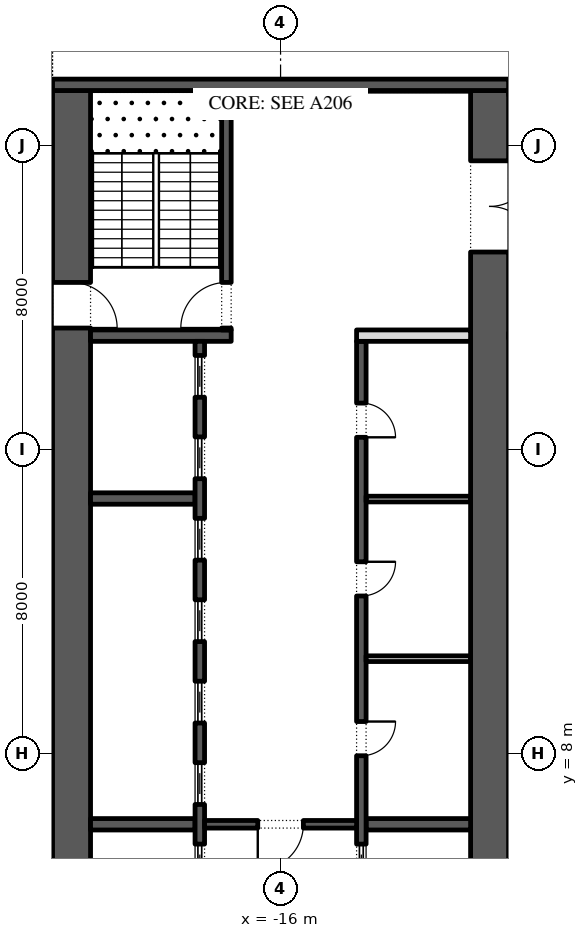
"""IFC4 building model, lengths in metres.
Left out: names, types, materials, properties, quantities, classifications, styles, units other than length and angle.
Written with IfcOpenShell. Run it as: python <this file> out.ifc"""

import sys

from ifc_helpers import new_model, si_unit, direction, frame, frame_2d, origin, place, context, subcontext, project, spatial, rectangle, extrude, element, fill, save


model = new_model("IFC4")
c1 = context("Model", 3, precision=1e-05, world=origin(), true_north=direction((0.0, 1.0)))
c2 = subcontext(c1, "Body", "Model", "MODEL_VIEW")
j1 = project(units=[si_unit("LENGTHUNIT", "METRE"), si_unit("PLANEANGLEUNIT", "RADIAN")], contexts=[c1])
p1 = place(None, origin())
s1 = spatial("IfcSite", under=j1, at=p1, CompositionType="ELEMENT")
p2 = place(p1, origin())
s2 = spatial("IfcBuilding", under=s1, at=p2, CompositionType="ELEMENT")
p3 = place(p2, frame((0.0, 0.0, 19.2)))
s3 = spatial("IfcBuildingStorey", under=s2, at=p3, CompositionType="ELEMENT", Elevation=19.2)
p4 = place(p3, frame((-21.5, -2.45, 0.0), z_axis=(0.0, 0.0, 1.0), x_axis=(0.0, 1.0, 0.0)))
e1 = element("IfcWall", 1, at=p4, inside=s3, PredefinedType="SHEAR", context=c2, shape_type="SweptSolid", body=[
    extrude(rectangle(XDim=27.9, YDim=1.0, at=frame_2d((13.95, 0.0))), origin(), (0.0, 0.0, 1.0), 4.5),
])
p5 = place(p4, frame((5.05, 0.0, 0.0)))
e2 = element("IfcOpeningElement", 2, at=p5, cuts=e1, PredefinedType="OPENING", context=c2, shape_type="SweptSolid", body=[
    extrude(rectangle(XDim=1.2, YDim=2.1, at=frame_2d((0.6, 1.05))), frame((0.0, 0.51, 0.0), z_axis=(0.0, -1.0, 0.0), x_axis=(1.0, 0.0, 0.0)), (0.0, 0.0, 1.0), 1.02),
])
p6 = place(p4, frame((21.65, 0.0, 0.0)))
e3 = element("IfcOpeningElement", 3, at=p6, cuts=e1, PredefinedType="OPENING", context=c2, shape_type="SweptSolid", body=[
    extrude(rectangle(XDim=1.2, YDim=2.1, at=frame_2d((0.6, 1.05))), frame((0.0, 0.51, 0.0), z_axis=(0.0, -1.0, 0.0), x_axis=(1.0, 0.0, 0.0)), (0.0, 0.0, 1.0), 1.02),
])
p7 = place(p3, frame((-10.5, -2.45, 0.0), z_axis=(0.0, 0.0, 1.0), x_axis=(0.0, 1.0, 0.0)))
e4 = element("IfcWall", 4, at=p7, inside=s3, PredefinedType="SHEAR", context=c2, shape_type="SweptSolid", body=[
    extrude(rectangle(XDim=27.9, YDim=1.0, at=frame_2d((13.95, 0.0))), origin(), (0.0, 0.0, 1.0), 4.5),
])
p8 = place(p7, frame((23.65, 0.0, 0.0)))
e5 = element("IfcOpeningElement", 5, at=p8, cuts=e4, PredefinedType="OPENING", context=c2, shape_type="SweptSolid", body=[
    extrude(rectangle(XDim=2.4, YDim=2.1, at=frame_2d((1.2, 1.05))), frame((0.0, 0.51, 0.0), z_axis=(0.0, -1.0, 0.0), x_axis=(1.0, 0.0, 0.0)), (0.0, 0.0, 1.0), 1.02),
])
p9 = place(p7, frame((0.788, 0.0, 0.0)))
e6 = element("IfcOpeningElement", 6, at=p9, cuts=e4, PredefinedType="OPENING", context=c2, shape_type="SweptSolid", body=[
    extrude(rectangle(XDim=0.9, YDim=2.1, at=frame_2d((0.45, 1.05))), frame((0.0, 0.51, 0.0), z_axis=(0.0, -1.0, 0.0), x_axis=(1.0, 0.0, 0.0)), (0.0, 0.0, 1.0), 1.02),
])
p10 = place(p7, frame((4.012, 0.0, 0.0)))
e7 = element("IfcOpeningElement", 7, at=p10, cuts=e4, PredefinedType="OPENING", context=c2, shape_type="SweptSolid", body=[
    extrude(rectangle(XDim=0.9, YDim=2.1, at=frame_2d((0.45, 1.05))), frame((0.0, 0.51, 0.0), z_axis=(0.0, -1.0, 0.0), x_axis=(1.0, 0.0, 0.0)), (0.0, 0.0, 1.0), 1.02),
])
p11 = place(p3, frame((-22.0, 25.6, 0.0), z_axis=(0.0, 0.0, 1.0), x_axis=(1.0, 0.0, 0.0)))
e8 = element("IfcWall", 8, at=p11, inside=s3, PredefinedType="SHEAR", context=c2, shape_type="SweptSolid", body=[
    extrude(rectangle(XDim=12.0, YDim=0.3, at=frame_2d((6.0, 0.0))), origin(), (0.0, 0.0, 1.0), 4.5),
])
p12 = place(p3, frame((-21.0, 19.0, 0.0), z_axis=(0.0, 0.0, 1.0), x_axis=(1.0, 0.0, 0.0)))
e9 = element("IfcWall", 9, at=p12, inside=s3, PredefinedType="SHEAR", context=c2, shape_type="SweptSolid", body=[
    extrude(rectangle(XDim=3.7, YDim=0.3, at=frame_2d((1.85, 0.0))), origin(), (0.0, 0.0, 1.0), 4.5),
])
p13 = place(p3, frame((-17.425, 19.15, 0.0), z_axis=(0.0, 0.0, 1.0), x_axis=(0.0, 1.0, 0.0)))
e10 = element("IfcWall", 10, at=p13, inside=s3, PredefinedType="SHEAR", context=c2, shape_type="SweptSolid", body=[
    extrude(rectangle(XDim=6.3, YDim=0.25, at=frame_2d((3.15, 0.0))), origin(), (0.0, 0.0, 1.0), 4.5),
])
p14 = place(p13, frame((0.05, 0.0, 0.0)))
e11 = element("IfcOpeningElement", 11, at=p14, cuts=e10, PredefinedType="OPENING", context=c2, shape_type="SweptSolid", body=[
    extrude(rectangle(XDim=1.2, YDim=2.1, at=frame_2d((0.6, 1.05))), frame((0.0, 0.135, 0.0), z_axis=(0.0, -1.0, 0.0), x_axis=(1.0, 0.0, 0.0)), (0.0, 0.0, 1.0), 0.27),
])
for number, where, z_axis, x_axis in (
    (12, (-21.0, 6.143, 0.0), (0.0, 0.0, 1.0), (1.0, 0.0, 0.0)),
    (13, (-21.0, 14.714, 0.0), (0.0, 0.0, 1.0), (1.0, 0.0, 0.0)),
):
    element("IfcWall", number, at=place(p3, frame(where, z_axis=z_axis, x_axis=x_axis)), inside=s3, PredefinedType="SHEAR", context=c2, shape_type="SweptSolid", body=[
        extrude(rectangle(XDim=2.75, YDim=0.3, at=frame_2d((1.375, 0.0))), origin(), (0.0, 0.0, 1.0), 4.5),
    ])
p15 = place(p3, frame((-18.125, 4.15, 0.0), z_axis=(0.0, 0.0, 1.0), x_axis=(0.0, 1.0, 0.0)))
e14 = element("IfcWall", 14, at=p15, inside=s3, PredefinedType="SHEAR", context=c2, shape_type="SweptSolid", body=[
    extrude(rectangle(XDim=14.7, YDim=0.25, at=frame_2d((7.35, 0.0))), origin(), (0.0, 0.0, 1.0), 4.5),
])
p16 = place(p15, frame((0.371, 0.0, 0.0)))
e15 = element("IfcOpeningElement", 15, at=p16, cuts=e14, PredefinedType="OPENING", context=c2, shape_type="SweptSolid", body=[
    extrude(rectangle(XDim=1.1, YDim=2.1, at=frame_2d((0.55, 1.05))), frame((0.0, 0.135, 0.0), z_axis=(0.0, -1.0, 0.0), x_axis=(1.0, 0.0, 0.0)), (0.0, 0.0, 1.0), 0.27),
])
p17 = place(p15, frame((2.514, 0.0, 0.0)))
e16 = element("IfcOpeningElement", 16, at=p17, cuts=e14, PredefinedType="OPENING", context=c2, shape_type="SweptSolid", body=[
    extrude(rectangle(XDim=1.1, YDim=2.1, at=frame_2d((0.55, 1.05))), frame((0.0, 0.135, 0.0), z_axis=(0.0, -1.0, 0.0), x_axis=(1.0, 0.0, 0.0)), (0.0, 0.0, 1.0), 0.27),
])
p18 = place(p15, frame((4.657, 0.0, 0.0)))
e17 = element("IfcOpeningElement", 17, at=p18, cuts=e14, PredefinedType="OPENING", context=c2, shape_type="SweptSolid", body=[
    extrude(rectangle(XDim=1.1, YDim=2.1, at=frame_2d((0.55, 1.05))), frame((0.0, 0.135, 0.0), z_axis=(0.0, -1.0, 0.0), x_axis=(1.0, 0.0, 0.0)), (0.0, 0.0, 1.0), 0.27),
])
p19 = place(p15, frame((6.8, 0.0, 0.0)))
e18 = element("IfcOpeningElement", 18, at=p19, cuts=e14, PredefinedType="OPENING", context=c2, shape_type="SweptSolid", body=[
    extrude(rectangle(XDim=1.1, YDim=2.1, at=frame_2d((0.55, 1.05))), frame((0.0, 0.135, 0.0), z_axis=(0.0, -1.0, 0.0), x_axis=(1.0, 0.0, 0.0)), (0.0, 0.0, 1.0), 0.27),
])
p20 = place(p15, frame((8.943, 0.0, 0.0)))
e19 = element("IfcOpeningElement", 19, at=p20, cuts=e14, PredefinedType="OPENING", context=c2, shape_type="SweptSolid", body=[
    extrude(rectangle(XDim=1.1, YDim=2.1, at=frame_2d((0.55, 1.05))), frame((0.0, 0.135, 0.0), z_axis=(0.0, -1.0, 0.0), x_axis=(1.0, 0.0, 0.0)), (0.0, 0.0, 1.0), 0.27),
])
p21 = place(p15, frame((11.086, 0.0, 0.0)))
e20 = element("IfcOpeningElement", 20, at=p21, cuts=e14, PredefinedType="OPENING", context=c2, shape_type="SweptSolid", body=[
    extrude(rectangle(XDim=1.1, YDim=2.1, at=frame_2d((0.55, 1.05))), frame((0.0, 0.135, 0.0), z_axis=(0.0, -1.0, 0.0), x_axis=(1.0, 0.0, 0.0)), (0.0, 0.0, 1.0), 0.27),
])
p22 = place(p15, frame((13.229, 0.0, 0.0)))
e21 = element("IfcOpeningElement", 21, at=p22, cuts=e14, PredefinedType="OPENING", context=c2, shape_type="SweptSolid", body=[
    extrude(rectangle(XDim=1.1, YDim=2.1, at=frame_2d((0.55, 1.05))), frame((0.0, 0.135, 0.0), z_axis=(0.0, -1.0, 0.0), x_axis=(1.0, 0.0, 0.0)), (0.0, 0.0, 1.0), 0.27),
])
p23 = place(p3, frame((-13.75, 6.143, 0.0), z_axis=(0.0, 0.0, 1.0), x_axis=(1.0, 0.0, 0.0)))
e22 = element("IfcWall", 22, at=p23, inside=s3, PredefinedType="SHEAR", context=c2, shape_type="SweptSolid", body=[
    extrude(rectangle(XDim=2.75, YDim=0.3, at=frame_2d((1.375, 0.0))), origin(), (0.0, 0.0, 1.0), 4.5),
])
p24 = place(p3, frame((-13.875, -2.45, 0.0), z_axis=(0.0, 0.0, 1.0), x_axis=(0.0, 1.0, 0.0)))
e23 = element("IfcWall", 23, at=p24, inside=s3, PredefinedType="SHEAR", context=c2, shape_type="SweptSolid", body=[
    extrude(rectangle(XDim=21.3, YDim=0.25, at=frame_2d((10.65, 0.0))), origin(), (0.0, 0.0, 1.0), 4.5),
])
p25 = place(p24, frame((10.396, 0.0, 0.0)))
e24 = element("IfcOpeningElement", 24, at=p25, cuts=e23, PredefinedType="OPENING", context=c2, shape_type="SweptSolid", body=[
    extrude(rectangle(XDim=0.9, YDim=2.1, at=frame_2d((0.45, 1.05))), frame((0.0, 0.135, 0.0), z_axis=(0.0, -1.0, 0.0), x_axis=(1.0, 0.0, 0.0)), (0.0, 0.0, 1.0), 0.27),
])
p26 = place(p24, frame((14.6, 0.0, 0.0)))
e25 = element("IfcOpeningElement", 25, at=p26, cuts=e23, PredefinedType="OPENING", context=c2, shape_type="SweptSolid", body=[
    extrude(rectangle(XDim=0.9, YDim=2.1, at=frame_2d((0.45, 1.05))), frame((0.0, 0.135, 0.0), z_axis=(0.0, -1.0, 0.0), x_axis=(1.0, 0.0, 0.0)), (0.0, 0.0, 1.0), 0.27),
])
p27 = place(p24, frame((18.775, 0.0, 0.0)))
e26 = element("IfcOpeningElement", 26, at=p27, cuts=e23, PredefinedType="OPENING", context=c2, shape_type="SweptSolid", body=[
    extrude(rectangle(XDim=0.9, YDim=2.1, at=frame_2d((0.45, 1.05))), frame((0.0, 0.135, 0.0), z_axis=(0.0, -1.0, 0.0), x_axis=(1.0, 0.0, 0.0)), (0.0, 0.0, 1.0), 0.27),
])
p28 = place(p24, frame((6.971, 0.0, 0.0)))
e27 = element("IfcOpeningElement", 27, at=p28, cuts=e23, PredefinedType="OPENING", context=c2, shape_type="SweptSolid", body=[
    extrude(rectangle(XDim=1.1, YDim=2.1, at=frame_2d((0.55, 1.05))), frame((0.0, 0.135, 0.0), z_axis=(0.0, -1.0, 0.0), x_axis=(1.0, 0.0, 0.0)), (0.0, 0.0, 1.0), 0.27),
])
p29 = place(p3, frame((-14.0, 19.0, 0.0), z_axis=(0.0, 0.0, 1.0), x_axis=(1.0, 0.0, 0.0)))
e28 = element("IfcWall", 28, at=p29, inside=s3, PredefinedType="PARTITIONING", context=c2, shape_type="SweptSolid", body=[
    extrude(rectangle(XDim=3.0, YDim=0.3, at=frame_2d((1.5, 0.0))), origin(), (0.0, 0.0, 1.0), 4.5),
])
for number, where, z_axis, x_axis in (
    (29, (-13.75, 10.5, 0.0), (0.0, 0.0, 1.0), (1.0, 0.0, 0.0)),
    (30, (-13.75, 14.7, 0.0), (0.0, 0.0, 1.0), (1.0, 0.0, 0.0)),
):
    element("IfcWall", number, at=place(p3, frame(where, z_axis=z_axis, x_axis=x_axis)), inside=s3, PredefinedType="PARTITIONING", context=c2, shape_type="SweptSolid", body=[
        extrude(rectangle(XDim=2.75, YDim=0.15, at=frame_2d((1.375, 0.0))), origin(), (0.0, 0.0, 1.0), 4.5),
    ])
p30 = place(p3, frame((-18.0, 6.143, 0.0), z_axis=(0.0, 0.0, 1.0), x_axis=(1.0, 0.0, 0.0)))
e31 = element("IfcWall", 31, at=p30, inside=s3, PredefinedType="SHEAR", context=c2, shape_type="SweptSolid", body=[
    extrude(rectangle(XDim=4.0, YDim=0.2, at=frame_2d((2.0, 0.0))), origin(), (0.0, 0.0, 1.0), 4.5),
])
p31 = place(p30, frame((1.4, 0.0, 0.0)))
e32 = element("IfcOpeningElement", 32, at=p31, cuts=e31, PredefinedType="OPENING", context=c2, shape_type="SweptSolid", body=[
    extrude(rectangle(XDim=1.2, YDim=2.1, at=frame_2d((0.6, 1.05))), frame((0.0, 0.11, 0.0), z_axis=(0.0, -1.0, 0.0), x_axis=(1.0, 0.0, 0.0)), (0.0, 0.0, 1.0), 0.22),
])
p32 = place(p3, frame((-10.0, 19.0, 0.0), z_axis=(0.0, 0.0, 1.0), x_axis=(1.0, 0.0, 0.0)))
e33 = element("IfcWall", 33, at=p32, inside=s3, PredefinedType="PARTITIONING", context=c2, shape_type="SweptSolid", body=[
    extrude(rectangle(XDim=7.925, YDim=0.15, at=frame_2d((3.962, 0.0))), origin(), (0.0, 0.0, 1.0), 4.5),
])
p33 = place(p3, frame((-10.0, 25.4, 0.0), z_axis=(0.0, 0.0, 1.0), x_axis=(1.0, 0.0, 0.0)))
e34 = element("IfcWall", 34, at=p33, inside=s3, PredefinedType="PARTITIONING", context=c2, shape_type="SweptSolid", body=[
    extrude(rectangle(XDim=7.925, YDim=0.15, at=frame_2d((3.962, 0.0))), origin(), (0.0, 0.0, 1.0), 4.5),
])
p34 = place(p33, frame((3.462, 0.0, 0.0)))
e35 = element("IfcOpeningElement", 35, at=p34, cuts=e34, PredefinedType="OPENING", context=c2, shape_type="SweptSolid", body=[
    extrude(rectangle(XDim=1.0, YDim=2.1, at=frame_2d((0.5, 1.05))), frame((0.0, 0.085, 0.0), z_axis=(0.0, -1.0, 0.0), x_axis=(1.0, 0.0, 0.0)), (0.0, 0.0, 1.0), 0.17),
])
p35 = place(p16, origin())
e36 = element("IfcDoor", 36, at=p35, inside=s3, OperationType="SLIDING_TO_LEFT", PredefinedType="DOOR", context=c2, shape_type="SweptSolid", body=[
    extrude(rectangle(XDim=1.1, YDim=2.1, at=frame_2d((0.55, 1.05))), frame((0.0, 0.025, 0.0), z_axis=(0.0, -1.0, 0.0), x_axis=(1.0, 0.0, 0.0)), (0.0, 0.0, 1.0), 0.05),
])
fill(e15, e36)
p36 = place(p17, origin())
e37 = element("IfcDoor", 37, at=p36, inside=s3, OperationType="SLIDING_TO_LEFT", PredefinedType="DOOR", context=c2, shape_type="SweptSolid", body=[
    extrude(rectangle(XDim=1.1, YDim=2.1, at=frame_2d((0.55, 1.05))), frame((0.0, 0.025, 0.0), z_axis=(0.0, -1.0, 0.0), x_axis=(1.0, 0.0, 0.0)), (0.0, 0.0, 1.0), 0.05),
])
fill(e16, e37)
p37 = place(p18, origin())
e38 = element("IfcDoor", 38, at=p37, inside=s3, OperationType="SLIDING_TO_LEFT", PredefinedType="DOOR", context=c2, shape_type="SweptSolid", body=[
    extrude(rectangle(XDim=1.1, YDim=2.1, at=frame_2d((0.55, 1.05))), frame((0.0, 0.025, 0.0), z_axis=(0.0, -1.0, 0.0), x_axis=(1.0, 0.0, 0.0)), (0.0, 0.0, 1.0), 0.05),
])
fill(e17, e38)
p38 = place(p19, origin())
e39 = element("IfcDoor", 39, at=p38, inside=s3, OperationType="SLIDING_TO_LEFT", PredefinedType="DOOR", context=c2, shape_type="SweptSolid", body=[
    extrude(rectangle(XDim=1.1, YDim=2.1, at=frame_2d((0.55, 1.05))), frame((0.0, 0.025, 0.0), z_axis=(0.0, -1.0, 0.0), x_axis=(1.0, 0.0, 0.0)), (0.0, 0.0, 1.0), 0.05),
])
fill(e18, e39)
p39 = place(p20, origin())
e40 = element("IfcDoor", 40, at=p39, inside=s3, OperationType="SLIDING_TO_LEFT", PredefinedType="DOOR", context=c2, shape_type="SweptSolid", body=[
    extrude(rectangle(XDim=1.1, YDim=2.1, at=frame_2d((0.55, 1.05))), frame((0.0, 0.025, 0.0), z_axis=(0.0, -1.0, 0.0), x_axis=(1.0, 0.0, 0.0)), (0.0, 0.0, 1.0), 0.05),
])
fill(e19, e40)
p40 = place(p21, origin())
e41 = element("IfcDoor", 41, at=p40, inside=s3, OperationType="SLIDING_TO_LEFT", PredefinedType="DOOR", context=c2, shape_type="SweptSolid", body=[
    extrude(rectangle(XDim=1.1, YDim=2.1, at=frame_2d((0.55, 1.05))), frame((0.0, 0.025, 0.0), z_axis=(0.0, -1.0, 0.0), x_axis=(1.0, 0.0, 0.0)), (0.0, 0.0, 1.0), 0.05),
])
fill(e20, e41)
p41 = place(p22, origin())
e42 = element("IfcDoor", 42, at=p41, inside=s3, OperationType="SLIDING_TO_LEFT", PredefinedType="DOOR", context=c2, shape_type="SweptSolid", body=[
    extrude(rectangle(XDim=1.1, YDim=2.1, at=frame_2d((0.55, 1.05))), frame((0.0, 0.025, 0.0), z_axis=(0.0, -1.0, 0.0), x_axis=(1.0, 0.0, 0.0)), (0.0, 0.0, 1.0), 0.05),
])
fill(e21, e42)
p42 = place(p25, frame((0.9, -0.2, 0.0), z_axis=(0.0, 0.0, 1.0), x_axis=(-1.0, 0.0, 0.0)))
e43 = element("IfcDoor", 43, at=p42, inside=s3, OperationType="SINGLE_SWING_RIGHT", PredefinedType="DOOR", context=c2, shape_type="SweptSolid", body=[
    extrude(rectangle(XDim=0.9, YDim=2.1, at=frame_2d((0.45, 1.05))), frame((0.0, -0.075, 0.0), z_axis=(0.0, -1.0, 0.0), x_axis=(1.0, 0.0, 0.0)), (0.0, 0.0, 1.0), 0.05),
])
fill(e24, e43)
p43 = place(p26, frame((0.9, -0.2, 0.0), z_axis=(0.0, 0.0, 1.0), x_axis=(-1.0, 0.0, 0.0)))
e44 = element("IfcDoor", 44, at=p43, inside=s3, OperationType="SINGLE_SWING_RIGHT", PredefinedType="DOOR", context=c2, shape_type="SweptSolid", body=[
    extrude(rectangle(XDim=0.9, YDim=2.1, at=frame_2d((0.45, 1.05))), frame((0.0, -0.075, 0.0), z_axis=(0.0, -1.0, 0.0), x_axis=(1.0, 0.0, 0.0)), (0.0, 0.0, 1.0), 0.05),
])
fill(e25, e44)
p44 = place(p27, frame((0.9, -0.2, 0.0), z_axis=(0.0, 0.0, 1.0), x_axis=(-1.0, 0.0, 0.0)))
e45 = element("IfcDoor", 45, at=p44, inside=s3, OperationType="SINGLE_SWING_LEFT", PredefinedType="DOOR", context=c2, shape_type="SweptSolid", body=[
    extrude(rectangle(XDim=0.9, YDim=2.1, at=frame_2d((0.45, 1.05))), frame((0.0, -0.075, 0.0), z_axis=(0.0, -1.0, 0.0), x_axis=(1.0, 0.0, 0.0)), (0.0, 0.0, 1.0), 0.05),
])
fill(e26, e45)
p45 = place(p28, origin())
e46 = element("IfcDoor", 46, at=p45, inside=s3, OperationType="SLIDING_TO_LEFT", PredefinedType="DOOR", context=c2, shape_type="SweptSolid", body=[
    extrude(rectangle(XDim=1.1, YDim=2.1, at=frame_2d((0.55, 1.05))), frame((0.0, 0.025, 0.0), z_axis=(0.0, -1.0, 0.0), x_axis=(1.0, 0.0, 0.0)), (0.0, 0.0, 1.0), 0.05),
])
fill(e27, e46)
p46 = place(p31, frame((1.2, 0.0, 0.0), z_axis=(0.0, 0.0, 1.0), x_axis=(-1.0, 0.0, 0.0)))
e47 = element("IfcDoor", 47, at=p46, inside=s3, OperationType="SINGLE_SWING_LEFT", PredefinedType="DOOR", context=c2, shape_type="SweptSolid", body=[
    extrude(rectangle(XDim=1.2, YDim=2.1, at=frame_2d((0.6, 1.05))), frame((0.0, 0.025, 0.0), z_axis=(0.0, -1.0, 0.0), x_axis=(1.0, 0.0, 0.0)), (0.0, 0.0, 1.0), 0.05),
])
fill(e32, e47)
p47 = place(p8, frame((2.4, 0.0, 0.0), z_axis=(0.0, 0.0, 1.0), x_axis=(-1.0, 0.0, 0.0)))
e48 = element("IfcDoor", 48, at=p47, inside=s3, OperationType="DOUBLE_DOOR_SINGLE_SWING", PredefinedType="DOOR", context=c2, shape_type="SweptSolid", body=[
    extrude(rectangle(XDim=2.4, YDim=2.1, at=frame_2d((1.2, 1.05))), frame((0.0, 0.025, 0.0), z_axis=(0.0, -1.0, 0.0), x_axis=(1.0, 0.0, 0.0)), (0.0, 0.0, 1.0), 0.05),
])
fill(e5, e48)
p48 = place(p14, origin())
e49 = element("IfcDoor", 49, at=p48, inside=s3, OperationType="SINGLE_SWING_RIGHT", PredefinedType="DOOR", context=c2, shape_type="SweptSolid", body=[
    extrude(rectangle(XDim=1.2, YDim=2.1, at=frame_2d((0.6, 1.05))), frame((0.0, 0.025, 0.0), z_axis=(0.0, -1.0, 0.0), x_axis=(1.0, 0.0, 0.0)), (0.0, 0.0, 1.0), 0.05),
])
fill(e11, e49)
p49 = place(p6, frame((1.2, 0.0, 0.0), z_axis=(0.0, 0.0, 1.0), x_axis=(-1.0, 0.0, 0.0)))
e50 = element("IfcDoor", 50, at=p49, inside=s3, OperationType="SINGLE_SWING_LEFT", PredefinedType="DOOR", context=c2, shape_type="SweptSolid", body=[
    extrude(rectangle(XDim=1.2, YDim=2.1, at=frame_2d((0.6, 1.05))), frame((0.0, 0.025, 0.0), z_axis=(0.0, -1.0, 0.0), x_axis=(1.0, 0.0, 0.0)), (0.0, 0.0, 1.0), 0.05),
])
fill(e3, e50)
save(model, sys.argv[1])
